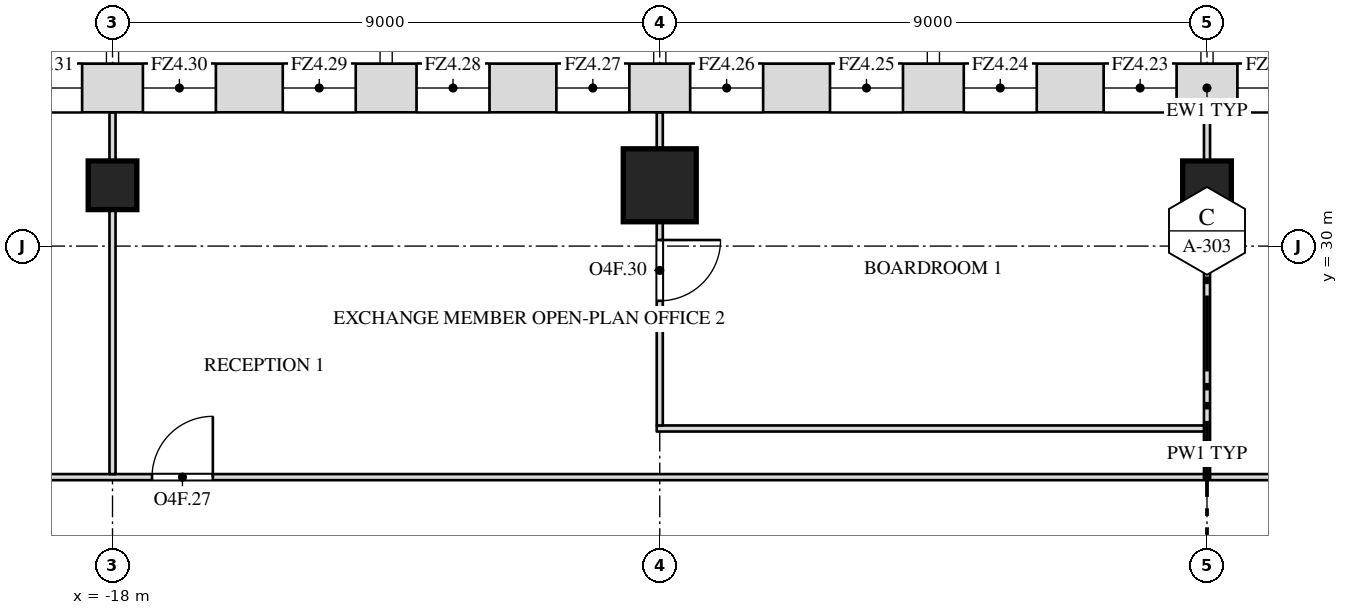
"""IFC4 building model, lengths in metres.
Left out: names, types, materials, properties, quantities, classifications, styles, units other than length and angle.
Written with IfcOpenShell. Run it as: python <this file> out.ifc"""

import sys

from ifc_helpers import new_model, si_unit, direction, frame, frame_2d, origin, origin_2d, place, context, subcontext, project, spatial, rectangle, extrude, element, fill, save


model = new_model("IFC4")
c1 = context("Model", 3, precision=1e-05, world=origin(), true_north=direction((0.0, 1.0)))
c2 = subcontext(c1, "Body", "Model", "MODEL_VIEW")
j1 = project(units=[si_unit("LENGTHUNIT", "METRE"), si_unit("PLANEANGLEUNIT", "RADIAN")], contexts=[c1])
p1 = place(None, origin())
s1 = spatial("IfcSite", under=j1, at=p1, CompositionType="ELEMENT")
p2 = place(p1, origin())
s2 = spatial("IfcBuilding", under=s1, at=p2, CompositionType="ELEMENT")
p3 = place(p2, frame((0.0, 0.0, 260.5)))
s3 = spatial("IfcBuildingStorey", under=s2, at=p3, CompositionType="ELEMENT", Elevation=260.5)
p4 = place(p3, frame((-18.0, 31.0, 0.0), z_axis=(0.0, 0.0, 1.0), x_axis=(1.0, 0.0, 0.0)))
e1 = element("IfcColumn", 1, at=p4, inside=s3, PredefinedType="COLUMN", context=c2, shape_type="SweptSolid", body=[
    extrude(rectangle(XDim=0.8, YDim=0.8, at=origin_2d()), origin(), (0.0, 0.0, 1.0), 4.0),
])
p5 = place(p3, frame((-9.0, 31.0, 0.0), z_axis=(0.0, 0.0, 1.0), x_axis=(1.0, 0.0, 0.0)))
e2 = element("IfcColumn", 2, at=p5, inside=s3, PredefinedType="COLUMN", context=c2, shape_type="SweptSolid", body=[
    extrude(rectangle(XDim=1.2, YDim=1.2, at=origin_2d()), origin(), (0.0, 0.0, 1.0), 4.0),
])
p6 = place(p3, frame((0.0, 31.0, 0.0), z_axis=(0.0, 0.0, 1.0), x_axis=(1.0, 0.0, 0.0)))
e3 = element("IfcColumn", 3, at=p6, inside=s3, PredefinedType="COLUMN", context=c2, shape_type="SweptSolid", body=[
    extrude(rectangle(XDim=0.8, YDim=0.8, at=origin_2d()), origin(), (0.0, 0.0, 1.0), 4.0),
])
p7 = place(p3, frame((-35.2, 26.2, 0.0), z_axis=(0.0, 0.0, 1.0), x_axis=(1.0, 0.0, 0.0)))
e4 = element("IfcWall", 4, at=p7, inside=s3, PredefinedType="PARTITIONING", context=c2, shape_type="SweptSolid", body=[
    extrude(rectangle(XDim=70.4, YDim=0.1, at=frame_2d((35.2, 0.0))), origin(), (0.0, 0.0, 1.0), 3.7),
])
p8 = place(p7, frame((10.9, 0.0, 0.0)))
e5 = element("IfcOpeningElement", 5, at=p8, cuts=e4, PredefinedType="OPENING", context=c2, shape_type="SweptSolid", body=[
    extrude(rectangle(XDim=1.0, YDim=2.1, at=frame_2d((0.5, 1.05))), frame((0.0, 0.062, 0.0), z_axis=(0.0, -1.0, 0.0), x_axis=(1.0, 0.0, 0.0)), (0.0, 0.0, 1.0), 0.124),
])
p9 = place(p7, frame((17.85, 0.0, 0.0)))
e6 = element("IfcOpeningElement", 6, at=p9, cuts=e4, PredefinedType="OPENING", context=c2, shape_type="SweptSolid", body=[
    extrude(rectangle(XDim=1.0, YDim=2.1, at=frame_2d((0.5, 1.05))), frame((0.0, 0.062, 0.0), z_axis=(0.0, -1.0, 0.0), x_axis=(1.0, 0.0, 0.0)), (0.0, 0.0, 1.0), 0.124),
])
p10 = place(p7, frame((46.9, 0.0, 0.0)))
e7 = element("IfcOpeningElement", 7, at=p10, cuts=e4, PredefinedType="OPENING", context=c2, shape_type="SweptSolid", body=[
    extrude(rectangle(XDim=1.8, YDim=2.1, at=frame_2d((0.9, 1.05))), frame((0.0, 0.062, 0.0), z_axis=(0.0, -1.0, 0.0), x_axis=(1.0, 0.0, 0.0)), (0.0, 0.0, 1.0), 0.124),
])
p11 = place(p7, frame((53.85, 0.0, 0.0)))
e8 = element("IfcOpeningElement", 8, at=p11, cuts=e4, PredefinedType="OPENING", context=c2, shape_type="SweptSolid", body=[
    extrude(rectangle(XDim=1.0, YDim=2.1, at=frame_2d((0.5, 1.05))), frame((0.0, 0.062, 0.0), z_axis=(0.0, -1.0, 0.0), x_axis=(1.0, 0.0, 0.0)), (0.0, 0.0, 1.0), 0.124),
])
p12 = place(p3, frame((-18.0, 26.25, 0.0), z_axis=(0.0, 0.0, 1.0), x_axis=(0.0, 1.0, 0.0)))
e9 = element("IfcWall", 9, at=p12, inside=s3, PredefinedType="PARTITIONING", context=c2, shape_type="SweptSolid", body=[
    extrude(rectangle(XDim=4.35, YDim=0.1, at=frame_2d((2.175, 0.0))), origin(), (0.0, 0.0, 1.0), 3.093),
])
p13 = place(p3, frame((-18.0, 31.4, 0.0), z_axis=(0.0, 0.0, 1.0), x_axis=(0.0, 1.0, 0.0)))
e10 = element("IfcWall", 10, at=p13, inside=s3, PredefinedType="PARTITIONING", context=c2, shape_type="SweptSolid", body=[
    extrude(rectangle(XDim=0.8, YDim=0.1, at=frame_2d((0.4, 0.0))), origin(), (0.0, 0.0, 1.0), 3.7),
])
p14 = place(p3, frame((0.0, 26.25, 0.0), z_axis=(0.0, 0.0, 1.0), x_axis=(0.0, 1.0, 0.0)))
e11 = element("IfcWall", 11, at=p14, inside=s3, PredefinedType="PARTITIONING", context=c2, shape_type="SweptSolid", body=[
    extrude(rectangle(XDim=4.35, YDim=0.1, at=frame_2d((2.175, 0.0))), origin(), (0.0, 0.0, 1.0), 3.093),
])
p15 = place(p3, frame((0.0, 31.4, 0.0), z_axis=(0.0, 0.0, 1.0), x_axis=(0.0, 1.0, 0.0)))
e12 = element("IfcWall", 12, at=p15, inside=s3, PredefinedType="PARTITIONING", context=c2, shape_type="SweptSolid", body=[
    extrude(rectangle(XDim=0.8, YDim=0.1, at=frame_2d((0.4, 0.0))), origin(), (0.0, 0.0, 1.0), 3.7),
])
p16 = place(p3, frame((-9.05, 27.0, 0.0), z_axis=(0.0, 0.0, 1.0), x_axis=(1.0, 0.0, 0.0)))
e13 = element("IfcWall", 13, at=p16, inside=s3, PredefinedType="PARTITIONING", context=c2, shape_type="SweptSolid", body=[
    extrude(rectangle(XDim=9.0, YDim=0.1, at=frame_2d((4.5, 0.0))), origin(), (0.0, 0.0, 1.0), 3.7),
])
p17 = place(p3, frame((-9.0, 27.05, 0.0), z_axis=(0.0, 0.0, 1.0), x_axis=(0.0, 1.0, 0.0)))
e14 = element("IfcWall", 14, at=p17, inside=s3, PredefinedType="PARTITIONING", context=c2, shape_type="SweptSolid", body=[
    extrude(rectangle(XDim=3.35, YDim=0.1, at=frame_2d((1.675, 0.0))), origin(), (0.0, 0.0, 1.0), 3.093),
])
p18 = place(p17, frame((2.05, 0.0, 0.0)))
e15 = element("IfcOpeningElement", 15, at=p18, cuts=e14, PredefinedType="OPENING", context=c2, shape_type="SweptSolid", body=[
    extrude(rectangle(XDim=1.0, YDim=2.1, at=frame_2d((0.5, 1.05))), frame((0.0, 0.062, 0.0), z_axis=(0.0, -1.0, 0.0), x_axis=(1.0, 0.0, 0.0)), (0.0, 0.0, 1.0), 0.124),
])
p19 = place(p3, frame((-9.0, 31.6, 0.0), z_axis=(0.0, 0.0, 1.0), x_axis=(0.0, 1.0, 0.0)))
e16 = element("IfcWall", 16, at=p19, inside=s3, PredefinedType="PARTITIONING", context=c2, shape_type="SweptSolid", body=[
    extrude(rectangle(XDim=0.6, YDim=0.1, at=frame_2d((0.3, 0.0))), origin(), (0.0, 0.0, 1.0), 3.7),
])
p20 = place(p3, frame((29.948, 32.6, 0.0), z_axis=(0.0, 0.0, 1.0), x_axis=(-1.0, 0.0, 0.0)))
e17 = element("IfcWall", 17, at=p20, inside=s3, PredefinedType="SOLIDWALL", context=c2, shape_type="SweptSolid", body=[
    extrude(rectangle(XDim=59.895, YDim=0.8, at=frame_2d((29.948, 0.0))), origin(), (0.0, 0.0, 1.0), 3.7),
])
p21 = place(p20, frame((3.448, 0.0, 0.8)))
e18 = element("IfcOpeningElement", 18, at=p21, cuts=e17, PredefinedType="OPENING", context=c2, shape_type="SweptSolid", body=[
    extrude(rectangle(XDim=1.2, YDim=2.7, at=frame_2d((0.6, 1.35))), frame((0.0, 0.412, 0.0), z_axis=(0.0, -1.0, 0.0), x_axis=(1.0, 0.0, 0.0)), (0.0, 0.0, 1.0), 0.824),
])
p22 = place(p20, frame((5.748, 0.0, 0.8)))
e19 = element("IfcOpeningElement", 19, at=p22, cuts=e17, PredefinedType="OPENING", context=c2, shape_type="SweptSolid", body=[
    extrude(rectangle(XDim=1.2, YDim=2.7, at=frame_2d((0.6, 1.35))), frame((0.0, 0.412, 0.0), z_axis=(0.0, -1.0, 0.0), x_axis=(1.0, 0.0, 0.0)), (0.0, 0.0, 1.0), 0.824),
])
p23 = place(p20, frame((7.948, 0.0, 0.8)))
e20 = element("IfcOpeningElement", 20, at=p23, cuts=e17, PredefinedType="OPENING", context=c2, shape_type="SweptSolid", body=[
    extrude(rectangle(XDim=1.2, YDim=2.7, at=frame_2d((0.6, 1.35))), frame((0.0, 0.412, 0.0), z_axis=(0.0, -1.0, 0.0), x_axis=(1.0, 0.0, 0.0)), (0.0, 0.0, 1.0), 0.824),
])
p24 = place(p20, frame((10.248, 0.0, 0.8)))
e21 = element("IfcOpeningElement", 21, at=p24, cuts=e17, PredefinedType="OPENING", context=c2, shape_type="SweptSolid", body=[
    extrude(rectangle(XDim=1.2, YDim=2.7, at=frame_2d((0.6, 1.35))), frame((0.0, 0.412, 0.0), z_axis=(0.0, -1.0, 0.0), x_axis=(1.0, 0.0, 0.0)), (0.0, 0.0, 1.0), 0.824),
])
p25 = place(p20, frame((12.448, 0.0, 0.8)))
e22 = element("IfcOpeningElement", 22, at=p25, cuts=e17, PredefinedType="OPENING", context=c2, shape_type="SweptSolid", body=[
    extrude(rectangle(XDim=1.2, YDim=2.7, at=frame_2d((0.6, 1.35))), frame((0.0, 0.412, 0.0), z_axis=(0.0, -1.0, 0.0), x_axis=(1.0, 0.0, 0.0)), (0.0, 0.0, 1.0), 0.824),
])
p26 = place(p20, frame((14.748, 0.0, 0.8)))
e23 = element("IfcOpeningElement", 23, at=p26, cuts=e17, PredefinedType="OPENING", context=c2, shape_type="SweptSolid", body=[
    extrude(rectangle(XDim=1.2, YDim=2.7, at=frame_2d((0.6, 1.35))), frame((0.0, 0.412, 0.0), z_axis=(0.0, -1.0, 0.0), x_axis=(1.0, 0.0, 0.0)), (0.0, 0.0, 1.0), 0.824),
])
p27 = place(p20, frame((16.948, 0.0, 0.8)))
e24 = element("IfcOpeningElement", 24, at=p27, cuts=e17, PredefinedType="OPENING", context=c2, shape_type="SweptSolid", body=[
    extrude(rectangle(XDim=1.2, YDim=2.7, at=frame_2d((0.6, 1.35))), frame((0.0, 0.412, 0.0), z_axis=(0.0, -1.0, 0.0), x_axis=(1.0, 0.0, 0.0)), (0.0, 0.0, 1.0), 0.824),
])
p28 = place(p20, frame((19.248, 0.0, 0.8)))
e25 = element("IfcOpeningElement", 25, at=p28, cuts=e17, PredefinedType="OPENING", context=c2, shape_type="SweptSolid", body=[
    extrude(rectangle(XDim=1.2, YDim=2.7, at=frame_2d((0.6, 1.35))), frame((0.0, 0.412, 0.0), z_axis=(0.0, -1.0, 0.0), x_axis=(1.0, 0.0, 0.0)), (0.0, 0.0, 1.0), 0.824),
])
p29 = place(p20, frame((21.448, 0.0, 0.8)))
e26 = element("IfcOpeningElement", 26, at=p29, cuts=e17, PredefinedType="OPENING", context=c2, shape_type="SweptSolid", body=[
    extrude(rectangle(XDim=1.2, YDim=2.7, at=frame_2d((0.6, 1.35))), frame((0.0, 0.412, 0.0), z_axis=(0.0, -1.0, 0.0), x_axis=(1.0, 0.0, 0.0)), (0.0, 0.0, 1.0), 0.824),
])
p30 = place(p20, frame((23.748, 0.0, 0.8)))
e27 = element("IfcOpeningElement", 27, at=p30, cuts=e17, PredefinedType="OPENING", context=c2, shape_type="SweptSolid", body=[
    extrude(rectangle(XDim=1.2, YDim=2.7, at=frame_2d((0.6, 1.35))), frame((0.0, 0.412, 0.0), z_axis=(0.0, -1.0, 0.0), x_axis=(1.0, 0.0, 0.0)), (0.0, 0.0, 1.0), 0.824),
])
p31 = place(p20, frame((25.948, 0.0, 0.8)))
e28 = element("IfcOpeningElement", 28, at=p31, cuts=e17, PredefinedType="OPENING", context=c2, shape_type="SweptSolid", body=[
    extrude(rectangle(XDim=1.2, YDim=2.7, at=frame_2d((0.6, 1.35))), frame((0.0, 0.412, 0.0), z_axis=(0.0, -1.0, 0.0), x_axis=(1.0, 0.0, 0.0)), (0.0, 0.0, 1.0), 0.824),
])
p32 = place(p20, frame((28.248, 0.0, 0.8)))
e29 = element("IfcOpeningElement", 29, at=p32, cuts=e17, PredefinedType="OPENING", context=c2, shape_type="SweptSolid", body=[
    extrude(rectangle(XDim=1.2, YDim=2.7, at=frame_2d((0.6, 1.35))), frame((0.0, 0.412, 0.0), z_axis=(0.0, -1.0, 0.0), x_axis=(1.0, 0.0, 0.0)), (0.0, 0.0, 1.0), 0.824),
])
p33 = place(p20, frame((30.448, 0.0, 0.8)))
e30 = element("IfcOpeningElement", 30, at=p33, cuts=e17, PredefinedType="OPENING", context=c2, shape_type="SweptSolid", body=[
    extrude(rectangle(XDim=1.2, YDim=2.7, at=frame_2d((0.6, 1.35))), frame((0.0, 0.412, 0.0), z_axis=(0.0, -1.0, 0.0), x_axis=(1.0, 0.0, 0.0)), (0.0, 0.0, 1.0), 0.824),
])
p34 = place(p20, frame((32.748, 0.0, 0.8)))
e31 = element("IfcOpeningElement", 31, at=p34, cuts=e17, PredefinedType="OPENING", context=c2, shape_type="SweptSolid", body=[
    extrude(rectangle(XDim=1.2, YDim=2.7, at=frame_2d((0.6, 1.35))), frame((0.0, 0.412, 0.0), z_axis=(0.0, -1.0, 0.0), x_axis=(1.0, 0.0, 0.0)), (0.0, 0.0, 1.0), 0.824),
])
p35 = place(p20, frame((34.948, 0.0, 0.8)))
e32 = element("IfcOpeningElement", 32, at=p35, cuts=e17, PredefinedType="OPENING", context=c2, shape_type="SweptSolid", body=[
    extrude(rectangle(XDim=1.2, YDim=2.7, at=frame_2d((0.6, 1.35))), frame((0.0, 0.412, 0.0), z_axis=(0.0, -1.0, 0.0), x_axis=(1.0, 0.0, 0.0)), (0.0, 0.0, 1.0), 0.824),
])
p36 = place(p20, frame((37.248, 0.0, 0.8)))
e33 = element("IfcOpeningElement", 33, at=p36, cuts=e17, PredefinedType="OPENING", context=c2, shape_type="SweptSolid", body=[
    extrude(rectangle(XDim=1.2, YDim=2.7, at=frame_2d((0.6, 1.35))), frame((0.0, 0.412, 0.0), z_axis=(0.0, -1.0, 0.0), x_axis=(1.0, 0.0, 0.0)), (0.0, 0.0, 1.0), 0.824),
])
p37 = place(p20, frame((39.448, 0.0, 0.8)))
e34 = element("IfcOpeningElement", 34, at=p37, cuts=e17, PredefinedType="OPENING", context=c2, shape_type="SweptSolid", body=[
    extrude(rectangle(XDim=1.2, YDim=2.7, at=frame_2d((0.6, 1.35))), frame((0.0, 0.412, 0.0), z_axis=(0.0, -1.0, 0.0), x_axis=(1.0, 0.0, 0.0)), (0.0, 0.0, 1.0), 0.824),
])
p38 = place(p20, frame((41.748, 0.0, 0.8)))
e35 = element("IfcOpeningElement", 35, at=p38, cuts=e17, PredefinedType="OPENING", context=c2, shape_type="SweptSolid", body=[
    extrude(rectangle(XDim=1.2, YDim=2.7, at=frame_2d((0.6, 1.35))), frame((0.0, 0.412, 0.0), z_axis=(0.0, -1.0, 0.0), x_axis=(1.0, 0.0, 0.0)), (0.0, 0.0, 1.0), 0.824),
])
p39 = place(p20, frame((43.948, 0.0, 0.8)))
e36 = element("IfcOpeningElement", 36, at=p39, cuts=e17, PredefinedType="OPENING", context=c2, shape_type="SweptSolid", body=[
    extrude(rectangle(XDim=1.2, YDim=2.7, at=frame_2d((0.6, 1.35))), frame((0.0, 0.412, 0.0), z_axis=(0.0, -1.0, 0.0), x_axis=(1.0, 0.0, 0.0)), (0.0, 0.0, 1.0), 0.824),
])
p40 = place(p20, frame((46.248, 0.0, 0.8)))
e37 = element("IfcOpeningElement", 37, at=p40, cuts=e17, PredefinedType="OPENING", context=c2, shape_type="SweptSolid", body=[
    extrude(rectangle(XDim=1.2, YDim=2.7, at=frame_2d((0.6, 1.35))), frame((0.0, 0.412, 0.0), z_axis=(0.0, -1.0, 0.0), x_axis=(1.0, 0.0, 0.0)), (0.0, 0.0, 1.0), 0.824),
])
p41 = place(p20, frame((48.448, 0.0, 0.8)))
e38 = element("IfcOpeningElement", 38, at=p41, cuts=e17, PredefinedType="OPENING", context=c2, shape_type="SweptSolid", body=[
    extrude(rectangle(XDim=1.2, YDim=2.7, at=frame_2d((0.6, 1.35))), frame((0.0, 0.412, 0.0), z_axis=(0.0, -1.0, 0.0), x_axis=(1.0, 0.0, 0.0)), (0.0, 0.0, 1.0), 0.824),
])
p42 = place(p20, frame((50.748, 0.0, 0.8)))
e39 = element("IfcOpeningElement", 39, at=p42, cuts=e17, PredefinedType="OPENING", context=c2, shape_type="SweptSolid", body=[
    extrude(rectangle(XDim=1.2, YDim=2.7, at=frame_2d((0.6, 1.35))), frame((0.0, 0.412, 0.0), z_axis=(0.0, -1.0, 0.0), x_axis=(1.0, 0.0, 0.0)), (0.0, 0.0, 1.0), 0.824),
])
p43 = place(p20, frame((52.948, 0.0, 0.8)))
e40 = element("IfcOpeningElement", 40, at=p43, cuts=e17, PredefinedType="OPENING", context=c2, shape_type="SweptSolid", body=[
    extrude(rectangle(XDim=1.2, YDim=2.7, at=frame_2d((0.6, 1.35))), frame((0.0, 0.412, 0.0), z_axis=(0.0, -1.0, 0.0), x_axis=(1.0, 0.0, 0.0)), (0.0, 0.0, 1.0), 0.824),
])
p44 = place(p20, frame((55.248, 0.0, 0.8)))
e41 = element("IfcOpeningElement", 41, at=p44, cuts=e17, PredefinedType="OPENING", context=c2, shape_type="SweptSolid", body=[
    extrude(rectangle(XDim=1.2, YDim=2.7, at=frame_2d((0.6, 1.35))), frame((0.0, 0.412, 0.0), z_axis=(0.0, -1.0, 0.0), x_axis=(1.0, 0.0, 0.0)), (0.0, 0.0, 1.0), 0.824),
])
p45 = place(p9, origin())
e42 = element("IfcDoor", 42, at=p45, inside=s3, OperationType="SINGLE_SWING_RIGHT", PredefinedType="DOOR", context=c2, shape_type="SweptSolid", body=[
    extrude(rectangle(XDim=1.0, YDim=2.1, at=frame_2d((0.5, 1.05))), frame((0.0, 0.025, 0.0), z_axis=(0.0, -1.0, 0.0), x_axis=(1.0, 0.0, 0.0)), (0.0, 0.0, 1.0), 0.05),
])
fill(e6, e42)
p46 = place(p18, origin())
e43 = element("IfcDoor", 43, at=p46, inside=s3, OperationType="SINGLE_SWING_LEFT", PredefinedType="DOOR", context=c2, shape_type="SweptSolid", body=[
    extrude(rectangle(XDim=1.0, YDim=2.1, at=frame_2d((0.5, 1.05))), frame((0.0, 0.025, 0.0), z_axis=(0.0, -1.0, 0.0), x_axis=(1.0, 0.0, 0.0)), (0.0, 0.0, 1.0), 0.05),
])
fill(e15, e43)
p47 = place(p32, origin())
e44 = element("IfcWindow", 44, at=p47, inside=s3, PartitioningType="SINGLE_PANEL", PredefinedType="WINDOW", context=c2, shape_type="SweptSolid", body=[
    extrude(rectangle(XDim=1.2, YDim=2.7, at=frame_2d((0.6, 1.35))), frame((0.0, 0.03, 0.0), z_axis=(0.0, -1.0, 0.0), x_axis=(1.0, 0.0, 0.0)), (0.0, 0.0, 1.0), 0.06),
])
fill(e29, e44)
p48 = place(p33, origin())
e45 = element("IfcWindow", 45, at=p48, inside=s3, PartitioningType="SINGLE_PANEL", PredefinedType="WINDOW", context=c2, shape_type="SweptSolid", body=[
    extrude(rectangle(XDim=1.2, YDim=2.7, at=frame_2d((0.6, 1.35))), frame((0.0, 0.03, 0.0), z_axis=(0.0, -1.0, 0.0), x_axis=(1.0, 0.0, 0.0)), (0.0, 0.0, 1.0), 0.06),
])
fill(e30, e45)
p49 = place(p34, origin())
e46 = element("IfcWindow", 46, at=p49, inside=s3, PartitioningType="SINGLE_PANEL", PredefinedType="WINDOW", context=c2, shape_type="SweptSolid", body=[
    extrude(rectangle(XDim=1.2, YDim=2.7, at=frame_2d((0.6, 1.35))), frame((0.0, 0.03, 0.0), z_axis=(0.0, -1.0, 0.0), x_axis=(1.0, 0.0, 0.0)), (0.0, 0.0, 1.0), 0.06),
])
fill(e31, e46)
p50 = place(p35, origin())
e47 = element("IfcWindow", 47, at=p50, inside=s3, PartitioningType="SINGLE_PANEL", PredefinedType="WINDOW", context=c2, shape_type="SweptSolid", body=[
    extrude(rectangle(XDim=1.2, YDim=2.7, at=frame_2d((0.6, 1.35))), frame((0.0, 0.03, 0.0), z_axis=(0.0, -1.0, 0.0), x_axis=(1.0, 0.0, 0.0)), (0.0, 0.0, 1.0), 0.06),
])
fill(e32, e47)
p51 = place(p36, origin())
e48 = element("IfcWindow", 48, at=p51, inside=s3, PartitioningType="SINGLE_PANEL", PredefinedType="WINDOW", context=c2, shape_type="SweptSolid", body=[
    extrude(rectangle(XDim=1.2, YDim=2.7, at=frame_2d((0.6, 1.35))), frame((0.0, 0.03, 0.0), z_axis=(0.0, -1.0, 0.0), x_axis=(1.0, 0.0, 0.0)), (0.0, 0.0, 1.0), 0.06),
])
fill(e33, e48)
p52 = place(p37, origin())
e49 = element("IfcWindow", 49, at=p52, inside=s3, PartitioningType="SINGLE_PANEL", PredefinedType="WINDOW", context=c2, shape_type="SweptSolid", body=[
    extrude(rectangle(XDim=1.2, YDim=2.7, at=frame_2d((0.6, 1.35))), frame((0.0, 0.03, 0.0), z_axis=(0.0, -1.0, 0.0), x_axis=(1.0, 0.0, 0.0)), (0.0, 0.0, 1.0), 0.06),
])
fill(e34, e49)
p53 = place(p38, origin())
e50 = element("IfcWindow", 50, at=p53, inside=s3, PartitioningType="SINGLE_PANEL", PredefinedType="WINDOW", context=c2, shape_type="SweptSolid", body=[
    extrude(rectangle(XDim=1.2, YDim=2.7, at=frame_2d((0.6, 1.35))), frame((0.0, 0.03, 0.0), z_axis=(0.0, -1.0, 0.0), x_axis=(1.0, 0.0, 0.0)), (0.0, 0.0, 1.0), 0.06),
])
fill(e35, e50)
p54 = place(p39, origin())
e51 = element("IfcWindow", 51, at=p54, inside=s3, PartitioningType="SINGLE_PANEL", PredefinedType="WINDOW", context=c2, shape_type="SweptSolid", body=[
    extrude(rectangle(XDim=1.2, YDim=2.7, at=frame_2d((0.6, 1.35))), frame((0.0, 0.03, 0.0), z_axis=(0.0, -1.0, 0.0), x_axis=(1.0, 0.0, 0.0)), (0.0, 0.0, 1.0), 0.06),
])
fill(e36, e51)
p55 = place(p40, origin())
e52 = element("IfcWindow", 52, at=p55, inside=s3, PartitioningType="SINGLE_PANEL", PredefinedType="WINDOW", context=c2, shape_type="SweptSolid", body=[
    extrude(rectangle(XDim=1.2, YDim=2.7, at=frame_2d((0.6, 1.35))), frame((0.0, 0.03, 0.0), z_axis=(0.0, -1.0, 0.0), x_axis=(1.0, 0.0, 0.0)), (0.0, 0.0, 1.0), 0.06),
])
fill(e37, e52)
p56 = place(p41, origin())
e53 = element("IfcWindow", 53, at=p56, inside=s3, PartitioningType="SINGLE_PANEL", PredefinedType="WINDOW", context=c2, shape_type="SweptSolid", body=[
    extrude(rectangle(XDim=1.2, YDim=2.7, at=frame_2d((0.6, 1.35))), frame((0.0, 0.03, 0.0), z_axis=(0.0, -1.0, 0.0), x_axis=(1.0, 0.0, 0.0)), (0.0, 0.0, 1.0), 0.06),
])
fill(e38, e53)
save(model, sys.argv[1])
